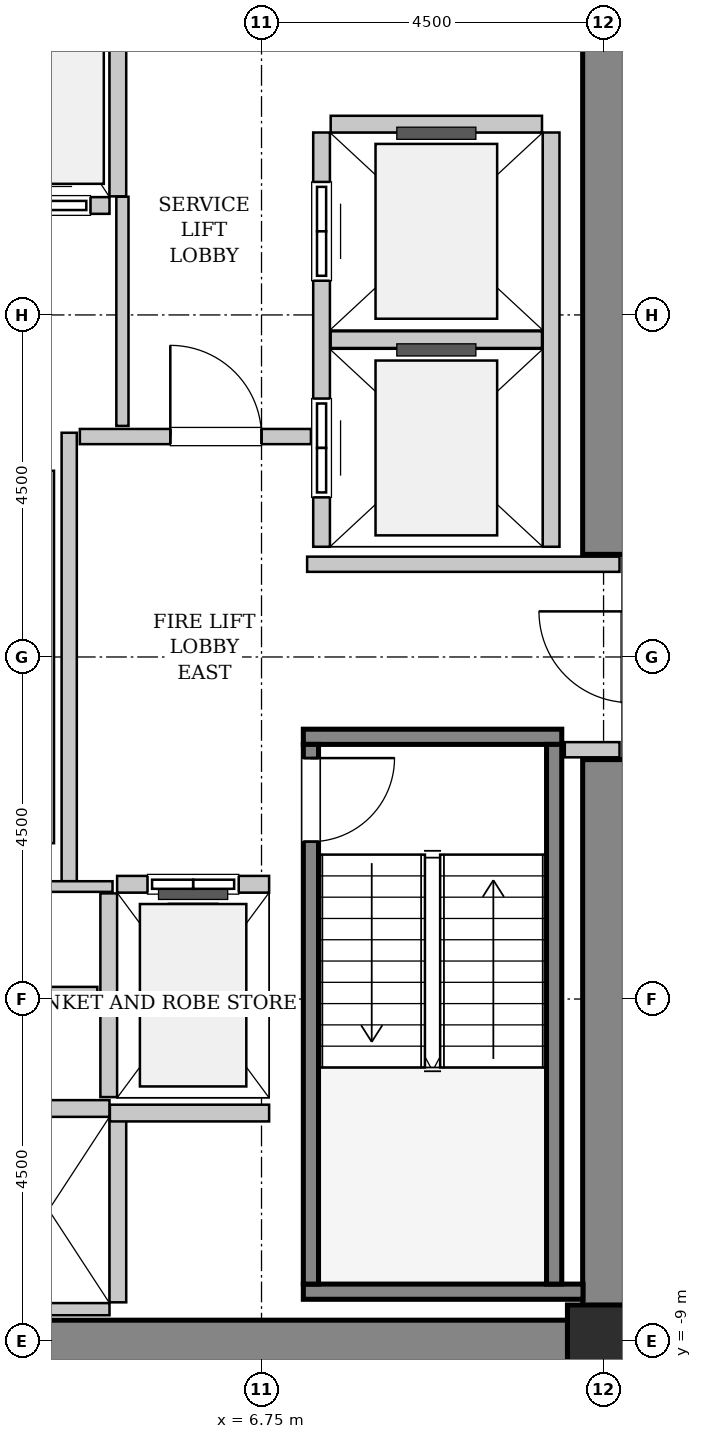
"""IFC4 building model, lengths in metres.
Left out: names, types, materials, properties, quantities, classifications, styles, units other than length and angle.
Written with IfcOpenShell. Run it as: python <this file> out.ifc"""

import sys

from ifc_helpers import new_model, si_unit, direction, frame, frame_2d, origin, origin_2d, place, context, subcontext, project, spatial, rectangle, hollow_rectangle, extrude, source, transform, mapped, element, fill, save


model = new_model("IFC4")
c1 = context("Model", 3, precision=1e-05, world=origin(), true_north=direction((0.0, 1.0)))
c2 = subcontext(c1, "Body", "Model", "MODEL_VIEW")
j1 = project(units=[si_unit("LENGTHUNIT", "METRE"), si_unit("PLANEANGLEUNIT", "RADIAN")], contexts=[c1])
p1 = place(None, origin())
s1 = spatial("IfcSite", under=j1, at=p1, CompositionType="ELEMENT")
p2 = place(p1, origin())
s2 = spatial("IfcBuilding", under=s1, at=p2, CompositionType="ELEMENT")
p3 = place(p2, frame((0.0, 0.0, 140.2)))
s3 = spatial("IfcBuildingStorey", under=s2, at=p3, CompositionType="ELEMENT", Elevation=140.2)
m1 = source(origin(), c2, "Body", "SweptSolid", [
    extrude(rectangle(XDim=9.975, YDim=0.55, at=frame_2d((4.987, 0.0))), origin(), (0.0, 0.0, 1.0), 3.8),
])
p4 = place(p3, frame((1.55, -9.0, 0.0), z_axis=(0.0, 0.0, 1.0), x_axis=(1.0, 0.0, 0.0)))
e1 = element("IfcWall", 1, at=p4, inside=s3, PredefinedType="SHEAR", context=c2, shape_type="MappedRepresentation", body=[
    mapped(m1, transform((0.0, 0.0, 0.0), x_axis=(1.0, 0.0, 0.0), y_axis=(0.0, 1.0, 0.0), z_axis=(0.0, 0.0, 1.0), scale=1.0)),
])
m2 = source(origin(), c2, "Body", "SweptSolid", [
    extrude(rectangle(XDim=7.375, YDim=0.55, at=frame_2d((3.688, 0.0))), origin(), (0.0, 0.0, 1.0), 3.8),
])
for number, where, z_axis, x_axis in (
    (2, (11.25, -8.725, 0.0), (0.0, 0.0, 1.0), (0.0, 1.0, 0.0)),
    (3, (11.25, 1.35, 0.0), (0.0, 0.0, 1.0), (0.0, 1.0, 0.0)),
):
    element("IfcWall", number, at=place(p3, frame(where, z_axis=z_axis, x_axis=x_axis)), inside=s3, PredefinedType="SHEAR", context=c2, shape_type="MappedRepresentation", body=[
        mapped(m2, transform((0.0, 0.0, 0.0), x_axis=(1.0, 0.0, 0.0), y_axis=(0.0, 1.0, 0.0), z_axis=(0.0, 0.0, 1.0), scale=1.0)),
    ])
m3 = source(origin(), c2, "Body", "SweptSolid", [
    extrude(hollow_rectangle(XDim=0.95, YDim=0.95, WallThickness=0.045, InnerFilletRadius=0.045, OuterFilletRadius=0.09, at=origin_2d()), origin(), (0.0, 0.0, 1.0), 3.8),
])
p5 = place(p3, frame((11.25, -9.0, 0.0), z_axis=(0.0, 0.0, 1.0), x_axis=(1.0, 0.0, 0.0)))
e4 = element("IfcColumn", 4, at=p5, inside=s3, PredefinedType="COLUMN", context=c2, shape_type="MappedRepresentation", body=[
    mapped(m3, transform((0.0, 0.0, 0.0), x_axis=(1.0, 0.0, 0.0), y_axis=(0.0, 1.0, 0.0), z_axis=(0.0, 0.0, 1.0), scale=1.0)),
])
m4 = source(origin(), c2, "Body", "SweptSolid", [
    extrude(rectangle(XDim=3.4, YDim=0.2, at=frame_2d((1.7, 0.0))), origin(), (0.0, 0.0, 1.0), 3.8),
])
p6 = place(p3, frame((7.3, -1.05, 0.0), z_axis=(0.0, 0.0, 1.0), x_axis=(1.0, 0.0, 0.0)))
e5 = element("IfcWall", 5, at=p6, inside=s3, PredefinedType="SOLIDWALL", context=c2, shape_type="MappedRepresentation", body=[
    mapped(m4, transform((0.0, 0.0, 0.0), x_axis=(1.0, 0.0, 0.0), y_axis=(0.0, 1.0, 0.0), z_axis=(0.0, 0.0, 1.0), scale=1.0)),
])
m5 = source(origin(), c2, "Body", "SweptSolid", [
    extrude(rectangle(XDim=3.68, YDim=0.2, at=frame_2d((1.84, 0.0))), origin(), (0.0, 0.0, 1.0), 3.8),
])
p7 = place(p3, frame((7.3, -8.35, 0.0), z_axis=(0.0, 0.0, 1.0), x_axis=(1.0, 0.0, 0.0)))
e6 = element("IfcWall", 6, at=p7, inside=s3, PredefinedType="SOLIDWALL", context=c2, shape_type="MappedRepresentation", body=[
    mapped(m5, transform((0.0, 0.0, 0.0), x_axis=(1.0, 0.0, 0.0), y_axis=(0.0, 1.0, 0.0), z_axis=(0.0, 0.0, 1.0), scale=1.0)),
])
m6 = source(origin(), c2, "Body", "SweptSolid", [
    extrude(rectangle(XDim=7.1, YDim=0.2, at=frame_2d((3.55, 0.0))), origin(), (0.0, 0.0, 1.0), 3.8),
])
p8 = place(p3, frame((7.4, -1.15, 0.0), z_axis=(0.0, 0.0, 1.0), x_axis=(0.0, -1.0, 0.0)))
e7 = element("IfcWall", 7, at=p8, inside=s3, PredefinedType="SOLIDWALL", context=c2, shape_type="MappedRepresentation", body=[
    mapped(m6, transform((0.0, 0.0, 0.0), x_axis=(1.0, 0.0, 0.0), y_axis=(0.0, 1.0, 0.0), z_axis=(0.0, 0.0, 1.0), scale=1.0)),
])
p9 = place(p8, frame((0.18, 0.0, 0.0)))
e8 = element("IfcOpeningElement", 8, at=p9, cuts=e7, PredefinedType="OPENING", context=c2, shape_type="SweptSolid", body=[
    extrude(rectangle(XDim=1.1, YDim=2.15, at=frame_2d((0.55, 1.075))), frame((0.0, 0.11, 0.0), z_axis=(0.0, -1.0, 0.0), x_axis=(1.0, 0.0, 0.0)), (0.0, 0.0, 1.0), 0.22),
])
p10 = place(p3, frame((10.6, -1.15, 0.0), z_axis=(0.0, 0.0, 1.0), x_axis=(0.0, -1.0, 0.0)))
e9 = element("IfcWall", 9, at=p10, inside=s3, PredefinedType="SOLIDWALL", context=c2, shape_type="MappedRepresentation", body=[
    mapped(m6, transform((0.0, 0.0, 0.0), x_axis=(1.0, 0.0, 0.0), y_axis=(0.0, 1.0, 0.0), z_axis=(0.0, 0.0, 1.0), scale=1.0)),
])
m7 = source(origin(), c2, "Body", "SweptSolid", [
    extrude(rectangle(XDim=2.0, YDim=0.22, at=frame_2d((1.0, 0.0))), origin(), (0.0, 0.0, 1.0), 3.485),
])
p11 = place(p3, frame((6.85, -2.99, 0.0), z_axis=(0.0, 0.0, 1.0), x_axis=(-1.0, 0.0, 0.0)))
e10 = element("IfcWall", 10, at=p11, inside=s3, PredefinedType="SOLIDWALL", context=c2, shape_type="MappedRepresentation", body=[
    mapped(m7, transform((0.0, 0.0, 0.0), x_axis=(1.0, 0.0, 0.0), y_axis=(0.0, 1.0, 0.0), z_axis=(0.0, 0.0, 1.0), scale=1.0)),
])
p12 = place(p11, frame((0.4, 0.0, 0.0)))
e11 = element("IfcOpeningElement", 11, at=p12, cuts=e10, PredefinedType="OPENING", context=c2, shape_type="SweptSolid", body=[
    extrude(rectangle(XDim=1.2, YDim=2.2, at=frame_2d((0.6, 1.1))), frame((0.0, 0.12, 0.0), z_axis=(0.0, -1.0, 0.0), x_axis=(1.0, 0.0, 0.0)), (0.0, 0.0, 1.0), 0.24),
])
m8 = source(origin(), c2, "Body", "SweptSolid", [
    extrude(rectangle(XDim=2.68, YDim=0.22, at=frame_2d((1.34, 0.0))), origin(), (0.0, 0.0, 1.0), 3.485),
])
p13 = place(p3, frame((4.74, -3.11, 0.0), z_axis=(0.0, 0.0, 1.0), x_axis=(0.0, -1.0, 0.0)))
e12 = element("IfcWall", 12, at=p13, inside=s3, PredefinedType="SOLIDWALL", context=c2, shape_type="MappedRepresentation", body=[
    mapped(m8, transform((0.0, 0.0, 0.0), x_axis=(1.0, 0.0, 0.0), y_axis=(0.0, 1.0, 0.0), z_axis=(0.0, 0.0, 1.0), scale=1.0)),
])
m9 = source(origin(), c2, "Body", "SweptSolid", [
    extrude(rectangle(XDim=5.45, YDim=0.22, at=frame_2d((2.725, 0.0))), origin(), (0.0, 0.0, 1.0), 3.485),
])
p14 = place(p3, frame((7.54, 6.9, 0.0), z_axis=(0.0, 0.0, 1.0), x_axis=(0.0, -1.0, 0.0)))
e13 = element("IfcWall", 13, at=p14, inside=s3, PredefinedType="SOLIDWALL", context=c2, shape_type="MappedRepresentation", body=[
    mapped(m9, transform((0.0, 0.0, 0.0), x_axis=(1.0, 0.0, 0.0), y_axis=(0.0, 1.0, 0.0), z_axis=(0.0, 0.0, 1.0), scale=1.0)),
])
p15 = place(p14, frame((3.5, 0.0, 0.0)))
e14 = element("IfcOpeningElement", 14, at=p15, cuts=e13, PredefinedType="OPENING", context=c2, shape_type="SweptSolid", body=[
    extrude(rectangle(XDim=1.3, YDim=2.3, at=frame_2d((0.65, 1.15))), frame((0.0, 0.12, 0.0), z_axis=(0.0, -1.0, 0.0), x_axis=(1.0, 0.0, 0.0)), (0.0, 0.0, 1.0), 0.24),
])
p16 = place(p14, frame((0.65, 0.0, 0.0)))
e15 = element("IfcOpeningElement", 15, at=p16, cuts=e13, PredefinedType="OPENING", context=c2, shape_type="SweptSolid", body=[
    extrude(rectangle(XDim=1.3, YDim=2.3, at=frame_2d((0.65, 1.15))), frame((0.0, 0.12, 0.0), z_axis=(0.0, -1.0, 0.0), x_axis=(1.0, 0.0, 0.0)), (0.0, 0.0, 1.0), 0.24),
])
p17 = place(p3, frame((10.56, 1.45, 0.0), z_axis=(0.0, 0.0, 1.0), x_axis=(0.0, 1.0, 0.0)))
e16 = element("IfcWall", 16, at=p17, inside=s3, PredefinedType="SOLIDWALL", context=c2, shape_type="MappedRepresentation", body=[
    mapped(m9, transform((0.0, 0.0, 0.0), x_axis=(1.0, 0.0, 0.0), y_axis=(0.0, 1.0, 0.0), z_axis=(0.0, 0.0, 1.0), scale=1.0)),
])
m10 = source(origin(), c2, "Body", "SweptSolid", [
    extrude(rectangle(XDim=2.78, YDim=0.22, at=frame_2d((1.39, 0.0))), origin(), (0.0, 0.0, 1.0), 3.485),
])
for number, where, z_axis, x_axis in (
    (17, (7.66, 4.175, 0.0), (0.0, 0.0, 1.0), (1.0, 0.0, 0.0)),
    (18, (10.44, 7.01, 0.0), (0.0, 0.0, 1.0), (-1.0, 0.0, 0.0)),
):
    element("IfcWall", number, at=place(p3, frame(where, z_axis=z_axis, x_axis=x_axis)), inside=s3, PredefinedType="SOLIDWALL", context=c2, shape_type="MappedRepresentation", body=[
        mapped(m10, transform((0.0, 0.0, 0.0), x_axis=(1.0, 0.0, 0.0), y_axis=(0.0, 1.0, 0.0), z_axis=(0.0, 0.0, 1.0), scale=1.0)),
    ])
m11 = source(origin(), c2, "Body", "SweptSolid", [
    extrude(rectangle(XDim=3.2, YDim=0.22, at=frame_2d((1.6, 0.0))), origin(), (0.0, 0.0, 1.0), 3.485),
])
p18 = place(p3, frame((1.55, 5.94, 0.0), z_axis=(0.0, 0.0, 1.0), x_axis=(1.0, 0.0, 0.0)))
e19 = element("IfcWall", 19, at=p18, inside=s3, PredefinedType="SOLIDWALL", context=c2, shape_type="MappedRepresentation", body=[
    mapped(m11, transform((0.0, 0.0, 0.0), x_axis=(1.0, 0.0, 0.0), y_axis=(0.0, 1.0, 0.0), z_axis=(0.0, 0.0, 1.0), scale=1.0)),
])
p19 = place(p18, frame((0.225, 0.0, 0.0)))
e20 = element("IfcOpeningElement", 20, at=p19, cuts=e19, PredefinedType="OPENING", context=c2, shape_type="SweptSolid", body=[
    extrude(rectangle(XDim=1.1, YDim=2.2, at=frame_2d((0.55, 1.1))), frame((0.0, 0.12, 0.0), z_axis=(0.0, -1.0, 0.0), x_axis=(1.0, 0.0, 0.0)), (0.0, 0.0, 1.0), 0.24),
])
p20 = place(p18, frame((1.85, 0.0, 0.0)))
e21 = element("IfcOpeningElement", 21, at=p20, cuts=e19, PredefinedType="OPENING", context=c2, shape_type="SweptSolid", body=[
    extrude(rectangle(XDim=1.1, YDim=2.2, at=frame_2d((0.55, 1.1))), frame((0.0, 0.12, 0.0), z_axis=(0.0, -1.0, 0.0), x_axis=(1.0, 0.0, 0.0)), (0.0, 0.0, 1.0), 0.24),
])
m12 = source(origin(), c2, "Body", "SweptSolid", [
    extrude(rectangle(XDim=2.43, YDim=0.22, at=frame_2d((1.215, 0.0))), origin(), (0.0, 0.0, 1.0), 3.485),
])
p21 = place(p3, frame((4.86, 6.06, 0.0), z_axis=(0.0, 0.0, 1.0), x_axis=(0.0, 1.0, 0.0)))
e22 = element("IfcWall", 22, at=p21, inside=s3, PredefinedType="SOLIDWALL", context=c2, shape_type="MappedRepresentation", body=[
    mapped(m12, transform((0.0, 0.0, 0.0), x_axis=(1.0, 0.0, 0.0), y_axis=(0.0, 1.0, 0.0), z_axis=(0.0, 0.0, 1.0), scale=1.0)),
])
p22 = place(p3, frame((4.75, -5.94, 0.0), z_axis=(0.0, 0.0, 1.0), x_axis=(-1.0, 0.0, 0.0)))
e23 = element("IfcWall", 23, at=p22, inside=s3, PredefinedType="SOLIDWALL", context=c2, shape_type="MappedRepresentation", body=[
    mapped(m11, transform((0.0, 0.0, 0.0), x_axis=(1.0, 0.0, 0.0), y_axis=(0.0, 1.0, 0.0), z_axis=(0.0, 0.0, 1.0), scale=1.0)),
])
m13 = source(origin(), c2, "Body", "SweptSolid", [
    extrude(rectangle(XDim=3.2, YDim=0.16, at=frame_2d((1.6, 0.0))), origin(), (0.0, 0.0, 1.0), 2.375),
])
p23 = place(p3, frame((1.55, -8.58, 0.0), z_axis=(0.0, 0.0, 1.0), x_axis=(1.0, 0.0, 0.0)))
e24 = element("IfcWall", 24, at=p23, inside=s3, PredefinedType="PARTITIONING", context=c2, shape_type="MappedRepresentation", body=[
    mapped(m13, transform((0.0, 0.0, 0.0), x_axis=(1.0, 0.0, 0.0), y_axis=(0.0, 1.0, 0.0), z_axis=(0.0, 0.0, 1.0), scale=1.0)),
])
p24 = place(p3, frame((4.86, -8.49, 0.0), z_axis=(0.0, 0.0, 1.0), x_axis=(0.0, 1.0, 0.0)))
e25 = element("IfcWall", 25, at=p24, inside=s3, PredefinedType="SOLIDWALL", context=c2, shape_type="MappedRepresentation", body=[
    mapped(m12, transform((0.0, 0.0, 0.0), x_axis=(1.0, 0.0, 0.0), y_axis=(0.0, 1.0, 0.0), z_axis=(0.0, 0.0, 1.0), scale=1.0)),
])
m14 = source(origin(), c2, "Body", "SweptSolid", [
    extrude(rectangle(XDim=4.9, YDim=0.22, at=frame_2d((2.45, 0.0))), origin(), (0.0, 0.0, 1.0), 3.485),
])
p25 = place(p3, frame((3.91, -2.45, 0.0), z_axis=(0.0, 0.0, 1.0), x_axis=(0.0, 1.0, 0.0)))
e26 = element("IfcWall", 26, at=p25, inside=s3, PredefinedType="SOLIDWALL", context=c2, shape_type="MappedRepresentation", body=[
    mapped(m14, transform((0.0, 0.0, 0.0), x_axis=(1.0, 0.0, 0.0), y_axis=(0.0, 1.0, 0.0), z_axis=(0.0, 0.0, 1.0), scale=1.0)),
])
m15 = source(origin(), c2, "Body", "SweptSolid", [
    extrude(rectangle(XDim=2.095, YDim=0.22, at=frame_2d((1.048, 0.0))), origin(), (0.0, 0.0, 1.0), 3.485),
])
p26 = place(p3, frame((4.755, -6.0, 0.0), z_axis=(0.0, 0.0, 1.0), x_axis=(1.0, 0.0, 0.0)))
e27 = element("IfcWall", 27, at=p26, inside=s3, PredefinedType="SOLIDWALL", context=c2, shape_type="MappedRepresentation", body=[
    mapped(m15, transform((0.0, 0.0, 0.0), x_axis=(1.0, 0.0, 0.0), y_axis=(0.0, 1.0, 0.0), z_axis=(0.0, 0.0, 1.0), scale=1.0)),
])
m16 = source(origin(), c2, "Body", "SweptSolid", [
    extrude(rectangle(XDim=5.9, YDim=0.2, at=frame_2d((2.95, 0.0))), origin(), (0.0, 0.0, 1.0), 3.485),
])
p27 = place(p3, frame((4.22, -2.95, 0.0), z_axis=(0.0, 0.0, 1.0), x_axis=(0.0, 1.0, 0.0)))
e28 = element("IfcWall", 28, at=p27, inside=s3, PredefinedType="PARTITIONING", context=c2, shape_type="MappedRepresentation", body=[
    mapped(m16, transform((0.0, 0.0, 0.0), x_axis=(1.0, 0.0, 0.0), y_axis=(0.0, 1.0, 0.0), z_axis=(0.0, 0.0, 1.0), scale=1.0)),
])
m17 = source(origin(), c2, "Body", "SweptSolid", [
    extrude(rectangle(XDim=3.04, YDim=0.2, at=frame_2d((1.52, 0.0))), origin(), (0.0, 0.0, 1.0), 3.485),
])
p28 = place(p3, frame((4.36, 2.9, 0.0), z_axis=(0.0, 0.0, 1.0), x_axis=(1.0, 0.0, 0.0)))
e29 = element("IfcWall", 29, at=p28, inside=s3, PredefinedType="PARTITIONING", context=c2, shape_type="MappedRepresentation", body=[
    mapped(m17, transform((0.0, 0.0, 0.0), x_axis=(1.0, 0.0, 0.0), y_axis=(0.0, 1.0, 0.0), z_axis=(0.0, 0.0, 1.0), scale=1.0)),
])
p29 = place(p28, frame((1.19, 0.0, 0.0)))
e30 = element("IfcOpeningElement", 30, at=p29, cuts=e29, PredefinedType="OPENING", context=c2, shape_type="SweptSolid", body=[
    extrude(rectangle(XDim=1.2, YDim=2.15, at=frame_2d((0.6, 1.075))), frame((0.0, 0.11, 0.0), z_axis=(0.0, -1.0, 0.0), x_axis=(1.0, 0.0, 0.0)), (0.0, 0.0, 1.0), 0.22),
])
m18 = source(origin(), c2, "Body", "SweptSolid", [
    extrude(rectangle(XDim=4.11, YDim=0.2, at=frame_2d((2.055, 0.0))), origin(), (0.0, 0.0, 1.0), 3.485),
])
p30 = place(p3, frame((7.35, 1.22, 0.0), z_axis=(0.0, 0.0, 1.0), x_axis=(1.0, 0.0, 0.0)))
e31 = element("IfcWall", 31, at=p30, inside=s3, PredefinedType="PARTITIONING", context=c2, shape_type="MappedRepresentation", body=[
    mapped(m18, transform((0.0, 0.0, 0.0), x_axis=(1.0, 0.0, 0.0), y_axis=(0.0, 1.0, 0.0), z_axis=(0.0, 0.0, 1.0), scale=1.0)),
])
m19 = source(origin(), c2, "Body", "SweptSolid", [
    extrude(rectangle(XDim=0.72, YDim=0.2, at=frame_2d((0.36, 0.0))), origin(), (0.0, 0.0, 1.0), 3.485),
])
p31 = place(p3, frame((10.74, -1.22, 0.0), z_axis=(0.0, 0.0, 1.0), x_axis=(1.0, 0.0, 0.0)))
e32 = element("IfcWall", 32, at=p31, inside=s3, PredefinedType="PARTITIONING", context=c2, shape_type="MappedRepresentation", body=[
    mapped(m19, transform((0.0, 0.0, 0.0), x_axis=(1.0, 0.0, 0.0), y_axis=(0.0, 1.0, 0.0), z_axis=(0.0, 0.0, 1.0), scale=1.0)),
])
m20 = source(origin(), c2, "Body", "SweptSolid", [
    extrude(rectangle(XDim=3.015, YDim=0.16, at=frame_2d((1.507, 0.0))), origin(), (0.0, 0.0, 1.0), 3.485),
])
p32 = place(p3, frame((4.92, 3.04, 0.0), z_axis=(0.0, 0.0, 1.0), x_axis=(0.0, 1.0, 0.0)))
e33 = element("IfcWall", 33, at=p32, inside=s3, PredefinedType="PARTITIONING", context=c2, shape_type="MappedRepresentation", body=[
    mapped(m20, transform((0.0, 0.0, 0.0), x_axis=(1.0, 0.0, 0.0), y_axis=(0.0, 1.0, 0.0), z_axis=(0.0, 0.0, 1.0), scale=1.0)),
])
m21 = source(origin(), c2, "Body", "SweptSolid", [
    extrude(rectangle(XDim=3.15, YDim=0.14, at=frame_2d((1.575, 0.0))), origin(), (0.0, 0.0, 1.0), 3.485),
])
p33 = place(p3, frame((1.64, -3.02, 0.0), z_axis=(0.0, 0.0, 1.0), x_axis=(1.0, 0.0, 0.0)))
e34 = element("IfcWall", 34, at=p33, inside=s3, PredefinedType="PARTITIONING", context=c2, shape_type="MappedRepresentation", body=[
    mapped(m21, transform((0.0, 0.0, 0.0), x_axis=(1.0, 0.0, 0.0), y_axis=(0.0, 1.0, 0.0), z_axis=(0.0, 0.0, 1.0), scale=1.0)),
])
m22 = source(origin(), c2, "Body", "SweptSolid", [
    extrude(rectangle(XDim=2.95, YDim=0.14, at=frame_2d((1.475, 0.0))), origin(), (0.0, 0.0, 1.0), 3.485),
])
p34 = place(p3, frame((1.64, -4.41, 0.0), z_axis=(0.0, 0.0, 1.0), x_axis=(1.0, 0.0, 0.0)))
e35 = element("IfcWall", 35, at=p34, inside=s3, PredefinedType="PARTITIONING", context=c2, shape_type="MappedRepresentation", body=[
    mapped(m22, transform((0.0, 0.0, 0.0), x_axis=(1.0, 0.0, 0.0), y_axis=(0.0, 1.0, 0.0), z_axis=(0.0, 0.0, 1.0), scale=1.0)),
])
m23 = source(origin(), c2, "Body", "SweptSolid", [
    extrude(rectangle(XDim=1.1, YDim=2.15, at=frame_2d((0.55, 1.075))), frame((0.0, 0.025, 0.0), z_axis=(0.0, -1.0, 0.0), x_axis=(1.0, 0.0, 0.0)), (0.0, 0.0, 1.0), 0.05),
])
p35 = place(p9, origin())
e36 = element("IfcDoor", 36, at=p35, inside=s3, OperationType="SINGLE_SWING_LEFT", PredefinedType="DOOR", context=c2, shape_type="MappedRepresentation", body=[
    mapped(m23, transform((0.0, 0.0, 0.0), x_axis=(1.0, 0.0, 0.0), y_axis=(0.0, 1.0, 0.0), z_axis=(0.0, 0.0, 1.0), scale=1.0)),
])
fill(e8, e36)
m24 = source(origin(), c2, "Body", "SweptSolid", [
    extrude(rectangle(XDim=1.2, YDim=2.2, at=frame_2d((0.6, 1.1))), frame((0.0, 0.025, 0.0), z_axis=(0.0, -1.0, 0.0), x_axis=(1.0, 0.0, 0.0)), (0.0, 0.0, 1.0), 0.05),
])
p36 = place(p12, origin())
e37 = element("IfcDoor", 37, at=p36, inside=s3, OperationType="SLIDING_TO_LEFT", PredefinedType="DOOR", context=c2, shape_type="MappedRepresentation", body=[
    mapped(m24, transform((0.0, 0.0, 0.0), x_axis=(1.0, 0.0, 0.0), y_axis=(0.0, 1.0, 0.0), z_axis=(0.0, 0.0, 1.0), scale=1.0)),
])
fill(e11, e37)
m25 = source(origin(), c2, "Body", "SweptSolid", [
    extrude(rectangle(XDim=1.3, YDim=2.3, at=frame_2d((0.65, 1.15))), frame((0.0, 0.025, 0.0), z_axis=(0.0, -1.0, 0.0), x_axis=(1.0, 0.0, 0.0)), (0.0, 0.0, 1.0), 0.05),
])
p37 = place(p15, origin())
e38 = element("IfcDoor", 38, at=p37, inside=s3, OperationType="SLIDING_TO_RIGHT", PredefinedType="DOOR", context=c2, shape_type="MappedRepresentation", body=[
    mapped(m25, transform((0.0, 0.0, 0.0), x_axis=(1.0, 0.0, 0.0), y_axis=(0.0, 1.0, 0.0), z_axis=(0.0, 0.0, 1.0), scale=1.0)),
])
fill(e14, e38)
p38 = place(p16, origin())
e39 = element("IfcDoor", 39, at=p38, inside=s3, OperationType="SLIDING_TO_RIGHT", PredefinedType="DOOR", context=c2, shape_type="MappedRepresentation", body=[
    mapped(m25, transform((0.0, 0.0, 0.0), x_axis=(1.0, 0.0, 0.0), y_axis=(0.0, 1.0, 0.0), z_axis=(0.0, 0.0, 1.0), scale=1.0)),
])
fill(e15, e39)
m26 = source(origin(), c2, "Body", "SweptSolid", [
    extrude(rectangle(XDim=1.1, YDim=2.2, at=frame_2d((0.55, 1.1))), frame((0.0, 0.025, 0.0), z_axis=(0.0, -1.0, 0.0), x_axis=(1.0, 0.0, 0.0)), (0.0, 0.0, 1.0), 0.05),
])
p39 = place(p20, origin())
e40 = element("IfcDoor", 40, at=p39, inside=s3, OperationType="DOUBLE_DOOR_SLIDING", PredefinedType="DOOR", context=c2, shape_type="MappedRepresentation", body=[
    mapped(m26, transform((0.0, 0.0, 0.0), x_axis=(1.0, 0.0, 0.0), y_axis=(0.0, 1.0, 0.0), z_axis=(0.0, 0.0, 1.0), scale=1.0)),
])
fill(e21, e40)
m27 = source(origin(), c2, "Body", "SweptSolid", [
    extrude(rectangle(XDim=1.2, YDim=2.15, at=frame_2d((0.6, 1.075))), frame((0.0, 0.025, 0.0), z_axis=(0.0, -1.0, 0.0), x_axis=(1.0, 0.0, 0.0)), (0.0, 0.0, 1.0), 0.05),
])
p40 = place(p29, origin())
e41 = element("IfcDoor", 41, at=p40, inside=s3, OperationType="SINGLE_SWING_LEFT", PredefinedType="DOOR", context=c2, shape_type="MappedRepresentation", body=[
    mapped(m27, transform((0.0, 0.0, 0.0), x_axis=(1.0, 0.0, 0.0), y_axis=(0.0, 1.0, 0.0), z_axis=(0.0, 0.0, 1.0), scale=1.0)),
])
fill(e30, e41)
save(model, sys.argv[1])
